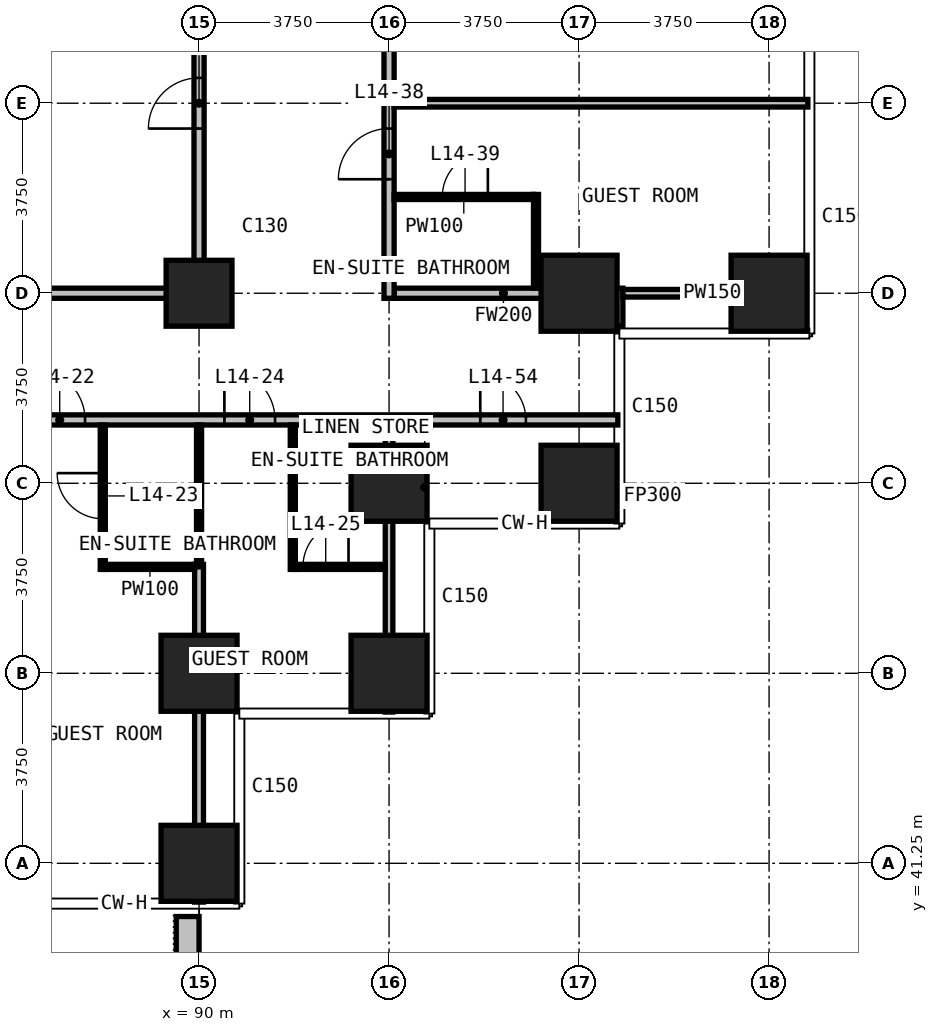
"""IFC4 building model, lengths in metres.
Left out: names, types, materials, properties, quantities, classifications, styles, units other than length and angle.
Written with IfcOpenShell. Run it as: python <this file> out.ifc"""

import sys

from ifc_helpers import new_model, si_unit, direction, frame, frame_2d, origin, origin_2d, place, context, subcontext, project, spatial, rectangle, extrude, element, fill, save


model = new_model("IFC4")
c1 = context("Model", 3, precision=1e-05, world=origin(), true_north=direction((0.0, 1.0)))
c2 = subcontext(c1, "Body", "Model", "MODEL_VIEW")
j1 = project(units=[si_unit("LENGTHUNIT", "METRE"), si_unit("PLANEANGLEUNIT", "RADIAN")], contexts=[c1])
p1 = place(None, origin())
s1 = spatial("IfcSite", under=j1, at=p1, CompositionType="ELEMENT")
p2 = place(p1, origin())
s2 = spatial("IfcBuilding", under=s1, at=p2, CompositionType="ELEMENT")
p3 = place(p2, frame((0.0, 0.0, 65.9)))
s3 = spatial("IfcBuildingStorey", under=s2, at=p3, CompositionType="ELEMENT", Elevation=65.9)
for number, where, z_axis, x_axis in (
    (1, (90.0, 41.25, 0.0), (0.0, 0.0, 1.0), (1.0, 0.0, 0.0)),
    (2, (90.0, 45.0, 0.0), (0.0, 0.0, 1.0), (1.0, 0.0, 0.0)),
):
    element("IfcColumn", number, at=place(p3, frame(where, z_axis=z_axis, x_axis=x_axis)), inside=s3, PredefinedType="COLUMN", context=c2, shape_type="SweptSolid", body=[
        extrude(rectangle(XDim=1.5, YDim=1.5, at=origin_2d()), origin(), (0.0, 0.0, 1.0), 3.3),
    ])
p4 = place(p3, frame((90.0, 52.5, 0.0), z_axis=(0.0, 0.0, 1.0), x_axis=(1.0, 0.0, 0.0)))
e3 = element("IfcColumn", 3, at=p4, inside=s3, PredefinedType="COLUMN", context=c2, shape_type="SweptSolid", body=[
    extrude(rectangle(XDim=1.3, YDim=1.3, at=origin_2d()), origin(), (0.0, 0.0, 1.0), 3.3),
])
for number, where, z_axis, x_axis in (
    (4, (93.75, 45.0, 0.0), (0.0, 0.0, 1.0), (1.0, 0.0, 0.0)),
    (5, (93.75, 48.75, 0.0), (0.0, 0.0, 1.0), (1.0, 0.0, 0.0)),
    (6, (97.5, 48.75, 0.0), (0.0, 0.0, 1.0), (1.0, 0.0, 0.0)),
    (7, (97.5, 52.5, 0.0), (0.0, 0.0, 1.0), (1.0, 0.0, 0.0)),
    (8, (101.25, 52.5, 0.0), (0.0, 0.0, 1.0), (1.0, 0.0, 0.0)),
):
    element("IfcColumn", number, at=place(p3, frame(where, z_axis=z_axis, x_axis=x_axis)), inside=s3, PredefinedType="COLUMN", context=c2, shape_type="SweptSolid", body=[
        extrude(rectangle(XDim=1.5, YDim=1.5, at=origin_2d()), origin(), (0.0, 0.0, 1.0), 3.3),
    ])
p5 = place(p3, frame((89.775, 40.2, 0.0), z_axis=(0.0, 0.0, 1.0), x_axis=(0.0, -1.0, 0.0)))
e9 = element("IfcWall", 9, at=p5, inside=s3, PredefinedType="USERDEFINED", context=c2, shape_type="SweptSolid", body=[
    extrude(rectangle(XDim=2.35, YDim=0.45, at=frame_2d((1.175, 0.0))), origin(), (0.0, 0.0, 1.0), 1.1),
])
p6 = place(p3, frame((51.735, 50.0, 0.0), z_axis=(0.0, 0.0, 1.0), x_axis=(1.0, 0.0, 0.0)))
e10 = element("IfcWall", 10, at=p6, inside=s3, PredefinedType="PARTITIONING", context=c2, shape_type="SweptSolid", body=[
    extrude(rectangle(XDim=46.53, YDim=0.2, at=frame_2d((23.265, 0.0))), origin(), (0.0, 0.0, 1.0), 3.0),
])
p7 = place(p6, frame((6.765, 0.0, 0.0)))
e11 = element("IfcOpeningElement", 11, at=p7, cuts=e10, PredefinedType="OPENING", context=c2, shape_type="SweptSolid", body=[
    extrude(rectangle(XDim=1.0, YDim=2.2, at=frame_2d((0.5, 1.1))), frame((0.0, 0.11, 0.0), z_axis=(0.0, -1.0, 0.0), x_axis=(1.0, 0.0, 0.0)), (0.0, 0.0, 1.0), 0.22),
])
p8 = place(p6, frame((10.515, 0.0, 0.0)))
e12 = element("IfcOpeningElement", 12, at=p8, cuts=e10, PredefinedType="OPENING", context=c2, shape_type="SweptSolid", body=[
    extrude(rectangle(XDim=1.0, YDim=2.2, at=frame_2d((0.5, 1.1))), frame((0.0, 0.11, 0.0), z_axis=(0.0, -1.0, 0.0), x_axis=(1.0, 0.0, 0.0)), (0.0, 0.0, 1.0), 0.22),
])
p9 = place(p6, frame((12.515, 0.0, 0.0)))
e13 = element("IfcOpeningElement", 13, at=p9, cuts=e10, PredefinedType="OPENING", context=c2, shape_type="SweptSolid", body=[
    extrude(rectangle(XDim=1.0, YDim=2.2, at=frame_2d((0.5, 1.1))), frame((0.0, 0.11, 0.0), z_axis=(0.0, -1.0, 0.0), x_axis=(1.0, 0.0, 0.0)), (0.0, 0.0, 1.0), 0.22),
])
p10 = place(p6, frame((18.015, 0.0, 0.0)))
e14 = element("IfcOpeningElement", 14, at=p10, cuts=e10, PredefinedType="OPENING", context=c2, shape_type="SweptSolid", body=[
    extrude(rectangle(XDim=1.0, YDim=2.2, at=frame_2d((0.5, 1.1))), frame((0.0, 0.11, 0.0), z_axis=(0.0, -1.0, 0.0), x_axis=(1.0, 0.0, 0.0)), (0.0, 0.0, 1.0), 0.22),
])
p11 = place(p6, frame((20.015, 0.0, 0.0)))
e15 = element("IfcOpeningElement", 15, at=p11, cuts=e10, PredefinedType="OPENING", context=c2, shape_type="SweptSolid", body=[
    extrude(rectangle(XDim=1.0, YDim=2.2, at=frame_2d((0.5, 1.1))), frame((0.0, 0.11, 0.0), z_axis=(0.0, -1.0, 0.0), x_axis=(1.0, 0.0, 0.0)), (0.0, 0.0, 1.0), 0.22),
])
p12 = place(p6, frame((25.515, 0.0, 0.0)))
e16 = element("IfcOpeningElement", 16, at=p12, cuts=e10, PredefinedType="OPENING", context=c2, shape_type="SweptSolid", body=[
    extrude(rectangle(XDim=1.0, YDim=2.2, at=frame_2d((0.5, 1.1))), frame((0.0, 0.11, 0.0), z_axis=(0.0, -1.0, 0.0), x_axis=(1.0, 0.0, 0.0)), (0.0, 0.0, 1.0), 0.22),
])
p13 = place(p6, frame((27.515, 0.0, 0.0)))
e17 = element("IfcOpeningElement", 17, at=p13, cuts=e10, PredefinedType="OPENING", context=c2, shape_type="SweptSolid", body=[
    extrude(rectangle(XDim=1.0, YDim=2.2, at=frame_2d((0.5, 1.1))), frame((0.0, 0.11, 0.0), z_axis=(0.0, -1.0, 0.0), x_axis=(1.0, 0.0, 0.0)), (0.0, 0.0, 1.0), 0.22),
])
p14 = place(p6, frame((33.015, 0.0, 0.0)))
e18 = element("IfcOpeningElement", 18, at=p14, cuts=e10, PredefinedType="OPENING", context=c2, shape_type="SweptSolid", body=[
    extrude(rectangle(XDim=1.0, YDim=2.2, at=frame_2d((0.5, 1.1))), frame((0.0, 0.11, 0.0), z_axis=(0.0, -1.0, 0.0), x_axis=(1.0, 0.0, 0.0)), (0.0, 0.0, 1.0), 0.22),
])
p15 = place(p6, frame((35.015, 0.0, 0.0)))
e19 = element("IfcOpeningElement", 19, at=p15, cuts=e10, PredefinedType="OPENING", context=c2, shape_type="SweptSolid", body=[
    extrude(rectangle(XDim=1.0, YDim=2.2, at=frame_2d((0.5, 1.1))), frame((0.0, 0.11, 0.0), z_axis=(0.0, -1.0, 0.0), x_axis=(1.0, 0.0, 0.0)), (0.0, 0.0, 1.0), 0.22),
])
p16 = place(p6, frame((38.765, 0.0, 0.0)))
e20 = element("IfcOpeningElement", 20, at=p16, cuts=e10, PredefinedType="OPENING", context=c2, shape_type="SweptSolid", body=[
    extrude(rectangle(XDim=1.0, YDim=2.2, at=frame_2d((0.5, 1.1))), frame((0.0, 0.11, 0.0), z_axis=(0.0, -1.0, 0.0), x_axis=(1.0, 0.0, 0.0)), (0.0, 0.0, 1.0), 0.22),
])
p17 = place(p6, frame((1.8, 0.0, 0.0)))
e21 = element("IfcOpeningElement", 21, at=p17, cuts=e10, PredefinedType="OPENING", context=c2, shape_type="SweptSolid", body=[
    extrude(rectangle(XDim=0.9, YDim=2.2, at=frame_2d((0.45, 1.1))), frame((0.0, 0.11, 0.0), z_axis=(0.0, -1.0, 0.0), x_axis=(1.0, 0.0, 0.0)), (0.0, 0.0, 1.0), 0.22),
])
p18 = place(p6, frame((43.815, 0.0, 0.0)))
e22 = element("IfcOpeningElement", 22, at=p18, cuts=e10, PredefinedType="OPENING", context=c2, shape_type="SweptSolid", body=[
    extrude(rectangle(XDim=0.9, YDim=2.2, at=frame_2d((0.45, 1.1))), frame((0.0, 0.11, 0.0), z_axis=(0.0, -1.0, 0.0), x_axis=(1.0, 0.0, 0.0)), (0.0, 0.0, 1.0), 0.22),
])
p19 = place(p3, frame((60.1, 52.5, 0.0), z_axis=(0.0, 0.0, 1.0), x_axis=(1.0, 0.0, 0.0)))
e23 = element("IfcWall", 23, at=p19, inside=s3, PredefinedType="PARTITIONING", context=c2, shape_type="SweptSolid", body=[
    extrude(rectangle(XDim=29.8, YDim=0.2, at=frame_2d((14.9, 0.0))), origin(), (0.0, 0.0, 1.0), 3.0),
])
p20 = place(p19, frame((10.65, 0.0, 0.0)))
e24 = element("IfcOpeningElement", 24, at=p20, cuts=e23, PredefinedType="OPENING", context=c2, shape_type="SweptSolid", body=[
    extrude(rectangle(XDim=1.0, YDim=2.2, at=frame_2d((0.5, 1.1))), frame((0.0, 0.11, 0.0), z_axis=(0.0, -1.0, 0.0), x_axis=(1.0, 0.0, 0.0)), (0.0, 0.0, 1.0), 0.22),
])
p21 = place(p19, frame((18.15, 0.0, 0.0)))
e25 = element("IfcOpeningElement", 25, at=p21, cuts=e23, PredefinedType="OPENING", context=c2, shape_type="SweptSolid", body=[
    extrude(rectangle(XDim=1.0, YDim=2.2, at=frame_2d((0.5, 1.1))), frame((0.0, 0.11, 0.0), z_axis=(0.0, -1.0, 0.0), x_axis=(1.0, 0.0, 0.0)), (0.0, 0.0, 1.0), 0.22),
])
p22 = place(p3, frame((93.85, 52.5, 0.0), z_axis=(0.0, 0.0, 1.0), x_axis=(1.0, 0.0, 0.0)))
e26 = element("IfcWall", 26, at=p22, inside=s3, PredefinedType="PARTITIONING", context=c2, shape_type="SweptSolid", body=[
    extrude(rectangle(XDim=4.315, YDim=0.2, at=frame_2d((2.157, 0.0))), origin(), (0.0, 0.0, 1.0), 3.0),
])
p23 = place(p3, frame((90.0, 52.4, 0.0), z_axis=(0.0, 0.0, 1.0), x_axis=(0.0, 1.0, 0.0)))
e27 = element("IfcWall", 27, at=p23, inside=s3, PredefinedType="PARTITIONING", context=c2, shape_type="SweptSolid", body=[
    extrude(rectangle(XDim=18.84, YDim=0.2, at=frame_2d((9.42, 0.0))), origin(), (0.0, 0.0, 1.0), 3.0),
])
p24 = place(p23, frame((3.35, 0.0, 0.0)))
e28 = element("IfcOpeningElement", 28, at=p24, cuts=e27, PredefinedType="OPENING", context=c2, shape_type="SweptSolid", body=[
    extrude(rectangle(XDim=1.0, YDim=2.2, at=frame_2d((0.5, 1.1))), frame((0.0, 0.11, 0.0), z_axis=(0.0, -1.0, 0.0), x_axis=(1.0, 0.0, 0.0)), (0.0, 0.0, 1.0), 0.22),
])
p25 = place(p23, frame((12.3, 0.0, 0.0)))
e29 = element("IfcOpeningElement", 29, at=p25, cuts=e27, PredefinedType="OPENING", context=c2, shape_type="SweptSolid", body=[
    extrude(rectangle(XDim=1.8, YDim=2.2, at=frame_2d((0.9, 1.1))), frame((0.0, 0.11, 0.0), z_axis=(0.0, -1.0, 0.0), x_axis=(1.0, 0.0, 0.0)), (0.0, 0.0, 1.0), 0.22),
])
p26 = place(p3, frame((93.75, 52.4, 0.0), z_axis=(0.0, 0.0, 1.0), x_axis=(0.0, 1.0, 0.0)))
e30 = element("IfcWall", 30, at=p26, inside=s3, PredefinedType="PARTITIONING", context=c2, shape_type="SweptSolid", body=[
    extrude(rectangle(XDim=38.31, YDim=0.2, at=frame_2d((19.155, 0.0))), origin(), (0.0, 0.0, 1.0), 3.0),
])
p27 = place(p26, frame((2.35, 0.0, 0.0)))
e31 = element("IfcOpeningElement", 31, at=p27, cuts=e30, PredefinedType="OPENING", context=c2, shape_type="SweptSolid", body=[
    extrude(rectangle(XDim=1.0, YDim=2.2, at=frame_2d((0.5, 1.1))), frame((0.0, 0.11, 0.0), z_axis=(0.0, -1.0, 0.0), x_axis=(1.0, 0.0, 0.0)), (0.0, 0.0, 1.0), 0.22),
])
p28 = place(p26, frame((4.95, 0.0, 0.0)))
e32 = element("IfcOpeningElement", 32, at=p28, cuts=e30, PredefinedType="OPENING", context=c2, shape_type="SweptSolid", body=[
    extrude(rectangle(XDim=1.0, YDim=2.2, at=frame_2d((0.5, 1.1))), frame((0.0, 0.11, 0.0), z_axis=(0.0, -1.0, 0.0), x_axis=(1.0, 0.0, 0.0)), (0.0, 0.0, 1.0), 0.22),
])
p29 = place(p26, frame((16.75, 0.0, 0.0)))
e33 = element("IfcOpeningElement", 33, at=p29, cuts=e30, PredefinedType="OPENING", context=c2, shape_type="SweptSolid", body=[
    extrude(rectangle(XDim=1.0, YDim=2.2, at=frame_2d((0.5, 1.1))), frame((0.0, 0.11, 0.0), z_axis=(0.0, -1.0, 0.0), x_axis=(1.0, 0.0, 0.0)), (0.0, 0.0, 1.0), 0.22),
])
p30 = place(p26, frame((19.95, 0.0, 0.0)))
e34 = element("IfcOpeningElement", 34, at=p30, cuts=e30, PredefinedType="OPENING", context=c2, shape_type="SweptSolid", body=[
    extrude(rectangle(XDim=1.0, YDim=2.2, at=frame_2d((0.5, 1.1))), frame((0.0, 0.11, 0.0), z_axis=(0.0, -1.0, 0.0), x_axis=(1.0, 0.0, 0.0)), (0.0, 0.0, 1.0), 0.22),
])
p31 = place(p26, frame((31.75, 0.0, 0.0)))
e35 = element("IfcOpeningElement", 35, at=p31, cuts=e30, PredefinedType="OPENING", context=c2, shape_type="SweptSolid", body=[
    extrude(rectangle(XDim=1.0, YDim=2.2, at=frame_2d((0.5, 1.1))), frame((0.0, 0.11, 0.0), z_axis=(0.0, -1.0, 0.0), x_axis=(1.0, 0.0, 0.0)), (0.0, 0.0, 1.0), 0.22),
])
p32 = place(p26, frame((35.65, 0.0, 0.0)))
e36 = element("IfcOpeningElement", 36, at=p32, cuts=e30, PredefinedType="OPENING", context=c2, shape_type="SweptSolid", body=[
    extrude(rectangle(XDim=0.9, YDim=2.2, at=frame_2d((0.45, 1.1))), frame((0.0, 0.11, 0.0), z_axis=(0.0, -1.0, 0.0), x_axis=(1.0, 0.0, 0.0)), (0.0, 0.0, 1.0), 0.22),
])
p33 = place(p3, frame((98.265, 51.855, 0.0), z_axis=(0.0, 0.0, 1.0), x_axis=(0.0, 1.0, 0.0)))
e37 = element("IfcWall", 37, at=p33, inside=s3, PredefinedType="PARTITIONING", context=c2, shape_type="SweptSolid", body=[
    extrude(rectangle(XDim=0.745, YDim=0.2, at=frame_2d((0.373, 0.0))), origin(), (0.0, 0.0, 1.0), 3.0),
])
p34 = place(p3, frame((90.0, 40.485, 0.0), z_axis=(0.0, 0.0, 1.0), x_axis=(0.0, 1.0, 0.0)))
e38 = element("IfcWall", 38, at=p34, inside=s3, PredefinedType="PARTITIONING", context=c2, shape_type="SweptSolid", body=[
    extrude(rectangle(XDim=6.665, YDim=0.175, at=frame_2d((3.333, 0.0))), origin(), (0.0, 0.0, 1.0), 3.0),
])
p35 = place(p3, frame((98.365, 52.5, 0.0), z_axis=(0.0, 0.0, 1.0), x_axis=(1.0, 0.0, 0.0)))
e39 = element("IfcWall", 39, at=p35, inside=s3, PredefinedType="PARTITIONING", context=c2, shape_type="SweptSolid", body=[
    extrude(rectangle(XDim=3.53, YDim=0.15, at=frame_2d((1.765, 0.0))), origin(), (0.0, 0.0, 1.0), 3.0),
])
p36 = place(p3, frame((93.85, 56.25, 0.0), z_axis=(0.0, 0.0, 1.0), x_axis=(1.0, 0.0, 0.0)))
e40 = element("IfcWall", 40, at=p36, inside=s3, PredefinedType="PARTITIONING", context=c2, shape_type="SweptSolid", body=[
    extrude(rectangle(XDim=8.165, YDim=0.15, at=frame_2d((4.083, 0.0))), origin(), (0.0, 0.0, 1.0), 3.0),
])
p37 = place(p3, frame((93.75, 44.235, 0.0), z_axis=(0.0, 0.0, 1.0), x_axis=(0.0, 1.0, 0.0)))
e41 = element("IfcWall", 41, at=p37, inside=s3, PredefinedType="PARTITIONING", context=c2, shape_type="SweptSolid", body=[
    extrude(rectangle(XDim=5.665, YDim=0.15, at=frame_2d((2.833, 0.0))), origin(), (0.0, 0.0, 1.0), 3.0),
])
p38 = place(p3, frame((88.15, 47.1, 0.0), z_axis=(0.0, 0.0, 1.0), x_axis=(1.0, 0.0, 0.0)))
e42 = element("IfcWall", 42, at=p38, inside=s3, PredefinedType="PARTITIONING", context=c2, shape_type="SweptSolid", body=[
    extrude(rectangle(XDim=1.762, YDim=0.1, at=frame_2d((0.881, 0.0))), origin(), (0.0, 0.0, 1.0), 3.0),
])
p39 = place(p3, frame((91.9, 47.1, 0.0), z_axis=(0.0, 0.0, 1.0), x_axis=(1.0, 0.0, 0.0)))
e43 = element("IfcWall", 43, at=p39, inside=s3, PredefinedType="PARTITIONING", context=c2, shape_type="SweptSolid", body=[
    extrude(rectangle(XDim=1.775, YDim=0.1, at=frame_2d((0.888, 0.0))), origin(), (0.0, 0.0, 1.0), 3.0),
])
p40 = place(p39, frame((0.15, 0.0, 0.0)))
e44 = element("IfcOpeningElement", 44, at=p40, cuts=e43, PredefinedType="OPENING", context=c2, shape_type="SweptSolid", body=[
    extrude(rectangle(XDim=0.9, YDim=2.2, at=frame_2d((0.45, 1.1))), frame((0.0, 0.06, 0.0), z_axis=(0.0, -1.0, 0.0), x_axis=(1.0, 0.0, 0.0)), (0.0, 0.0, 1.0), 0.12),
])
p41 = place(p3, frame((93.85, 54.4, 0.0), z_axis=(0.0, 0.0, 1.0), x_axis=(1.0, 0.0, 0.0)))
e45 = element("IfcWall", 45, at=p41, inside=s3, PredefinedType="PARTITIONING", context=c2, shape_type="SweptSolid", body=[
    extrude(rectangle(XDim=2.75, YDim=0.1, at=frame_2d((1.375, 0.0))), origin(), (0.0, 0.0, 1.0), 3.0),
])
p42 = place(p41, frame((0.95, 0.0, 0.0)))
e46 = element("IfcOpeningElement", 46, at=p42, cuts=e45, PredefinedType="OPENING", context=c2, shape_type="SweptSolid", body=[
    extrude(rectangle(XDim=0.9, YDim=2.2, at=frame_2d((0.45, 1.1))), frame((0.0, 0.06, 0.0), z_axis=(0.0, -1.0, 0.0), x_axis=(1.0, 0.0, 0.0)), (0.0, 0.0, 1.0), 0.12),
])
p43 = place(p3, frame((88.1, 47.05, 0.0), z_axis=(0.0, 0.0, 1.0), x_axis=(0.0, 1.0, 0.0)))
e47 = element("IfcWall", 47, at=p43, inside=s3, PredefinedType="PARTITIONING", context=c2, shape_type="SweptSolid", body=[
    extrude(rectangle(XDim=2.85, YDim=0.1, at=frame_2d((1.425, 0.0))), origin(), (0.0, 0.0, 1.0), 3.0),
])
p44 = place(p43, frame((1.0, 0.0, 0.0)))
e48 = element("IfcOpeningElement", 48, at=p44, cuts=e47, PredefinedType="OPENING", context=c2, shape_type="SweptSolid", body=[
    extrude(rectangle(XDim=0.9, YDim=2.2, at=frame_2d((0.45, 1.1))), frame((0.0, 0.06, 0.0), z_axis=(0.0, -1.0, 0.0), x_axis=(1.0, 0.0, 0.0)), (0.0, 0.0, 1.0), 0.12),
])
p45 = place(p3, frame((90.0, 47.1, 0.0), z_axis=(0.0, 0.0, 1.0), x_axis=(0.0, 1.0, 0.0)))
e49 = element("IfcWall", 49, at=p45, inside=s3, PredefinedType="PARTITIONING", context=c2, shape_type="SweptSolid", body=[
    extrude(rectangle(XDim=2.8, YDim=0.1, at=frame_2d((1.4, 0.0))), origin(), (0.0, 0.0, 1.0), 3.0),
])
p46 = place(p3, frame((91.85, 47.05, 0.0), z_axis=(0.0, 0.0, 1.0), x_axis=(0.0, 1.0, 0.0)))
e50 = element("IfcWall", 50, at=p46, inside=s3, PredefinedType="PARTITIONING", context=c2, shape_type="SweptSolid", body=[
    extrude(rectangle(XDim=2.85, YDim=0.1, at=frame_2d((1.425, 0.0))), origin(), (0.0, 0.0, 1.0), 3.0),
])
p47 = place(p3, frame((96.65, 52.6, 0.0), z_axis=(0.0, 0.0, 1.0), x_axis=(0.0, 1.0, 0.0)))
e51 = element("IfcWall", 51, at=p47, inside=s3, PredefinedType="PARTITIONING", context=c2, shape_type="SweptSolid", body=[
    extrude(rectangle(XDim=1.85, YDim=0.1, at=frame_2d((0.925, 0.0))), origin(), (0.0, 0.0, 1.0), 3.0),
])
p48 = place(p15, origin())
e52 = element("IfcDoor", 52, at=p48, inside=s3, OperationType="SINGLE_SWING_LEFT", PredefinedType="DOOR", context=c2, shape_type="SweptSolid", body=[
    extrude(rectangle(XDim=1.0, YDim=2.2, at=frame_2d((0.5, 1.1))), frame((0.0, 0.025, 0.0), z_axis=(0.0, -1.0, 0.0), x_axis=(1.0, 0.0, 0.0)), (0.0, 0.0, 1.0), 0.05),
])
fill(e19, e52)
p49 = place(p44, origin())
e53 = element("IfcDoor", 53, at=p49, inside=s3, OperationType="SINGLE_SWING_RIGHT", PredefinedType="DOOR", context=c2, shape_type="SweptSolid", body=[
    extrude(rectangle(XDim=0.9, YDim=2.2, at=frame_2d((0.45, 1.1))), frame((0.0, 0.025, 0.0), z_axis=(0.0, -1.0, 0.0), x_axis=(1.0, 0.0, 0.0)), (0.0, 0.0, 1.0), 0.05),
])
fill(e48, e53)
p50 = place(p16, origin())
e54 = element("IfcDoor", 54, at=p50, inside=s3, OperationType="SINGLE_SWING_LEFT", PredefinedType="DOOR", context=c2, shape_type="SweptSolid", body=[
    extrude(rectangle(XDim=1.0, YDim=2.2, at=frame_2d((0.5, 1.1))), frame((0.0, 0.025, 0.0), z_axis=(0.0, -1.0, 0.0), x_axis=(1.0, 0.0, 0.0)), (0.0, 0.0, 1.0), 0.05),
])
fill(e20, e54)
p51 = place(p40, origin())
e55 = element("IfcDoor", 55, at=p51, inside=s3, OperationType="SINGLE_SWING_RIGHT", PredefinedType="DOOR", context=c2, shape_type="SweptSolid", body=[
    extrude(rectangle(XDim=0.9, YDim=2.2, at=frame_2d((0.45, 1.1))), frame((0.0, 0.025, 0.0), z_axis=(0.0, -1.0, 0.0), x_axis=(1.0, 0.0, 0.0)), (0.0, 0.0, 1.0), 0.05),
])
fill(e44, e55)
p52 = place(p27, origin())
e56 = element("IfcDoor", 56, at=p52, inside=s3, OperationType="SINGLE_SWING_RIGHT", PredefinedType="DOOR", context=c2, shape_type="SweptSolid", body=[
    extrude(rectangle(XDim=1.0, YDim=2.2, at=frame_2d((0.5, 1.1))), frame((0.0, 0.025, 0.0), z_axis=(0.0, -1.0, 0.0), x_axis=(1.0, 0.0, 0.0)), (0.0, 0.0, 1.0), 0.05),
])
fill(e31, e56)
p53 = place(p42, origin())
e57 = element("IfcDoor", 57, at=p53, inside=s3, OperationType="SINGLE_SWING_RIGHT", PredefinedType="DOOR", context=c2, shape_type="SweptSolid", body=[
    extrude(rectangle(XDim=0.9, YDim=2.2, at=frame_2d((0.45, 1.1))), frame((0.0, 0.025, 0.0), z_axis=(0.0, -1.0, 0.0), x_axis=(1.0, 0.0, 0.0)), (0.0, 0.0, 1.0), 0.05),
])
fill(e46, e57)
p54 = place(p18, origin())
e58 = element("IfcDoor", 58, at=p54, inside=s3, OperationType="SINGLE_SWING_LEFT", PredefinedType="DOOR", context=c2, shape_type="SweptSolid", body=[
    extrude(rectangle(XDim=0.9, YDim=2.2, at=frame_2d((0.45, 1.1))), frame((0.0, 0.025, 0.0), z_axis=(0.0, -1.0, 0.0), x_axis=(1.0, 0.0, 0.0)), (0.0, 0.0, 1.0), 0.05),
])
fill(e22, e58)
p55 = place(p24, origin())
e59 = element("IfcDoor", 59, at=p55, inside=s3, OperationType="SINGLE_SWING_RIGHT", PredefinedType="DOOR", context=c2, shape_type="SweptSolid", body=[
    extrude(rectangle(XDim=1.0, YDim=2.2, at=frame_2d((0.5, 1.1))), frame((0.0, 0.025, 0.0), z_axis=(0.0, -1.0, 0.0), x_axis=(1.0, 0.0, 0.0)), (0.0, 0.0, 1.0), 0.05),
])
fill(e28, e59)
save(model, sys.argv[1])
